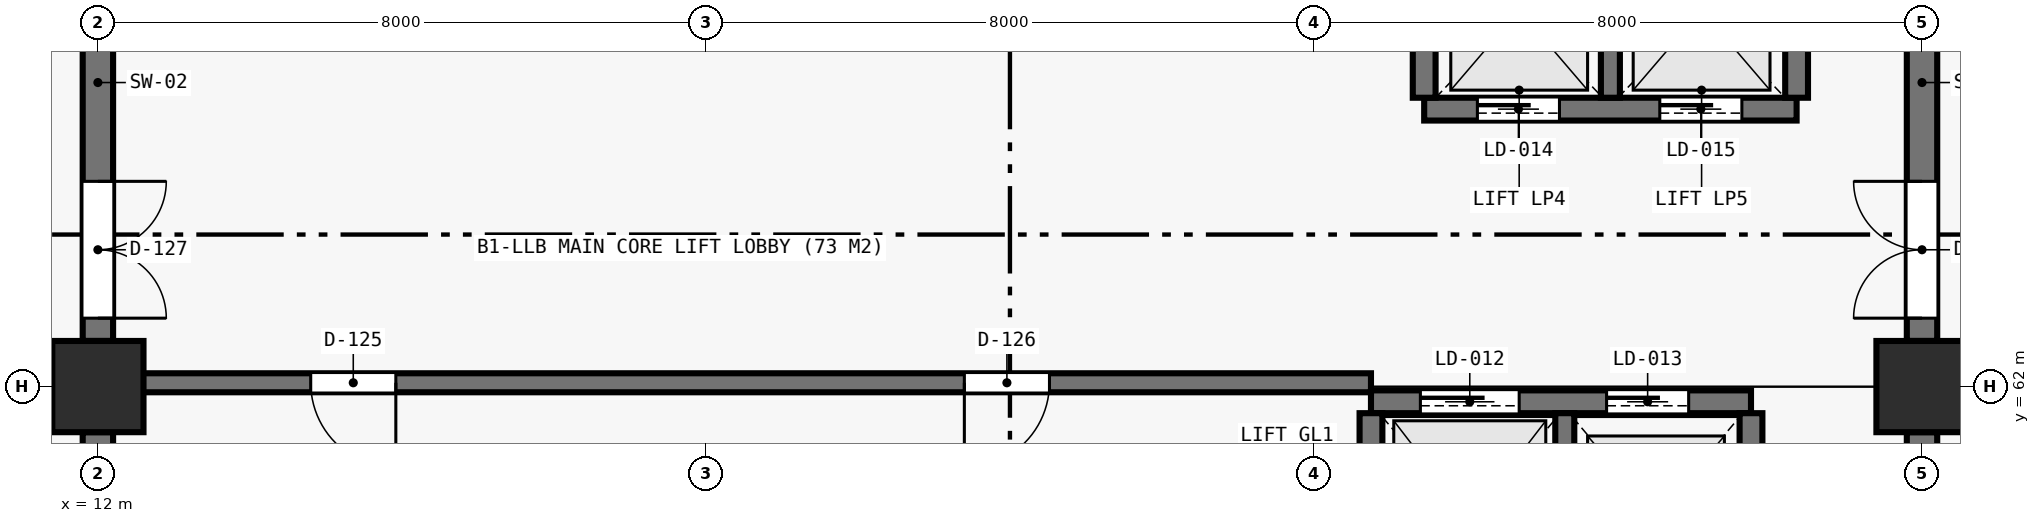
"""IFC4 building model, lengths in metres.
Left out: names, types, materials, properties, quantities, classifications, styles, units other than length and angle.
Written with IfcOpenShell. Run it as: python <this file> out.ifc"""

import sys

from ifc_helpers import new_model, si_unit, direction, frame, frame_2d, origin, origin_2d, place, context, subcontext, project, spatial, rectangle, extrude, element, fill, save


model = new_model("IFC4")
c1 = context("Model", 3, precision=1e-05, world=origin(), true_north=direction((0.0, 1.0)))
c2 = subcontext(c1, "Body", "Model", "MODEL_VIEW")
j1 = project(units=[si_unit("LENGTHUNIT", "METRE"), si_unit("PLANEANGLEUNIT", "RADIAN")], contexts=[c1])
p1 = place(None, origin())
s1 = spatial("IfcSite", under=j1, at=p1, CompositionType="ELEMENT")
p2 = place(p1, origin())
s2 = spatial("IfcBuilding", under=s1, at=p2, CompositionType="ELEMENT")
p3 = place(p2, frame((0.0, 0.0, -6.3)))
s3 = spatial("IfcBuildingStorey", under=s2, at=p3, CompositionType="ELEMENT", Elevation=-6.3)
for number, where, z_axis, x_axis in (
    (1, (12.0, 62.0, 0.0), (0.0, 0.0, 1.0), (1.0, 0.0, 0.0)),
    (2, (36.0, 62.0, 0.0), (0.0, 0.0, 1.0), (1.0, 0.0, 0.0)),
):
    element("IfcColumn", number, at=place(p3, frame(where, z_axis=z_axis, x_axis=x_axis)), inside=s3, PredefinedType="COLUMN", context=c2, shape_type="SweptSolid", body=[
        extrude(rectangle(XDim=1.2, YDim=1.2, at=origin_2d()), origin(), (0.0, 0.0, 1.0), 5.85),
    ])
p4 = place(p3, frame((12.0, 54.6, 0.0), z_axis=(0.0, 0.0, 1.0), x_axis=(0.0, 1.0, 0.0)))
e3 = element("IfcWall", 3, at=p4, inside=s3, PredefinedType="SHEAR", context=c2, shape_type="SweptSolid", body=[
    extrude(rectangle(XDim=6.8, YDim=0.4, at=frame_2d((3.4, 0.0))), origin(), (0.0, 0.0, 1.0), 5.85),
])
p5 = place(p3, frame((12.0, 62.6, 0.0), z_axis=(0.0, 0.0, 1.0), x_axis=(0.0, 1.0, 0.0)))
e4 = element("IfcWall", 4, at=p5, inside=s3, PredefinedType="SHEAR", context=c2, shape_type="SweptSolid", body=[
    extrude(rectangle(XDim=6.8, YDim=0.4, at=frame_2d((3.4, 0.0))), origin(), (0.0, 0.0, 1.0), 5.85),
])
p6 = place(p5, frame((0.3, 0.0, 0.0)))
e5 = element("IfcOpeningElement", 5, at=p6, cuts=e4, PredefinedType="OPENING", context=c2, shape_type="SweptSolid", body=[
    extrude(rectangle(XDim=1.8, YDim=2.2, at=frame_2d((0.9, 1.1))), frame((0.0, 0.21, 0.0), z_axis=(0.0, -1.0, 0.0), x_axis=(1.0, 0.0, 0.0)), (0.0, 0.0, 1.0), 0.42),
])
p7 = place(p3, frame((36.0, 54.6, 0.0), z_axis=(0.0, 0.0, 1.0), x_axis=(0.0, 1.0, 0.0)))
e6 = element("IfcWall", 6, at=p7, inside=s3, PredefinedType="SHEAR", context=c2, shape_type="SweptSolid", body=[
    extrude(rectangle(XDim=6.8, YDim=0.4, at=frame_2d((3.4, 0.0))), origin(), (0.0, 0.0, 1.0), 5.85),
])
p8 = place(p3, frame((36.0, 62.6, 0.0), z_axis=(0.0, 0.0, 1.0), x_axis=(0.0, 1.0, 0.0)))
e7 = element("IfcWall", 7, at=p8, inside=s3, PredefinedType="SHEAR", context=c2, shape_type="SweptSolid", body=[
    extrude(rectangle(XDim=6.8, YDim=0.4, at=frame_2d((3.4, 0.0))), origin(), (0.0, 0.0, 1.0), 5.85),
])
p9 = place(p8, frame((0.3, 0.0, 0.0)))
e8 = element("IfcOpeningElement", 8, at=p9, cuts=e7, PredefinedType="OPENING", context=c2, shape_type="SweptSolid", body=[
    extrude(rectangle(XDim=1.8, YDim=2.2, at=frame_2d((0.9, 1.1))), frame((0.0, 0.21, 0.0), z_axis=(0.0, -1.0, 0.0), x_axis=(1.0, 0.0, 0.0)), (0.0, 0.0, 1.0), 0.42),
])
p10 = place(p3, frame((28.75, 61.8, 0.0), z_axis=(0.0, 0.0, 1.0), x_axis=(1.0, 0.0, 0.0)))
e9 = element("IfcWall", 9, at=p10, inside=s3, PredefinedType="SHEAR", context=c2, shape_type="SweptSolid", body=[
    extrude(rectangle(XDim=5.0, YDim=0.3, at=frame_2d((2.5, 0.0))), origin(), (0.0, 0.0, 1.0), 5.85),
])
p11 = place(p10, frame((0.65, 0.0, 0.0)))
e10 = element("IfcOpeningElement", 10, at=p11, cuts=e9, PredefinedType="OPENING", context=c2, shape_type="SweptSolid", body=[
    extrude(rectangle(XDim=1.3, YDim=2.3, at=frame_2d((0.65, 1.15))), frame((0.0, 0.16, 0.0), z_axis=(0.0, -1.0, 0.0), x_axis=(1.0, 0.0, 0.0)), (0.0, 0.0, 1.0), 0.32),
])
p12 = place(p10, frame((3.1, 0.0, 0.0)))
e11 = element("IfcOpeningElement", 11, at=p12, cuts=e9, PredefinedType="OPENING", context=c2, shape_type="SweptSolid", body=[
    extrude(rectangle(XDim=1.08, YDim=2.2, at=frame_2d((0.54, 1.1))), frame((0.0, 0.16, 0.0), z_axis=(0.0, -1.0, 0.0), x_axis=(1.0, 0.0, 0.0)), (0.0, 0.0, 1.0), 0.32),
])
for number, where, z_axis, x_axis in (
    (12, (28.75, 58.8, 0.0), (0.0, 0.0, 1.0), (0.0, 1.0, 0.0)),
    (13, (33.75, 58.8, 0.0), (0.0, 0.0, 1.0), (0.0, 1.0, 0.0)),
):
    element("IfcWall", number, at=place(p3, frame(where, z_axis=z_axis, x_axis=x_axis)), inside=s3, PredefinedType="SHEAR", context=c2, shape_type="SweptSolid", body=[
        extrude(rectangle(XDim=2.85, YDim=0.3, at=frame_2d((1.425, 0.0))), origin(), (0.0, 0.0, 1.0), 5.85),
    ])
p13 = place(p3, frame((31.3, 58.8, 0.0), z_axis=(0.0, 0.0, 1.0), x_axis=(0.0, 1.0, 0.0)))
e14 = element("IfcWall", 14, at=p13, inside=s3, PredefinedType="SHEAR", context=c2, shape_type="SweptSolid", body=[
    extrude(rectangle(XDim=2.85, YDim=0.25, at=frame_2d((1.425, 0.0))), origin(), (0.0, 0.0, 1.0), 5.85),
])
p14 = place(p3, frame((12.2, 62.05, 0.0), z_axis=(0.0, 0.0, 1.0), x_axis=(1.0, 0.0, 0.0)))
e15 = element("IfcWall", 15, at=p14, inside=s3, PredefinedType="SHEAR", context=c2, shape_type="SweptSolid", body=[
    extrude(rectangle(XDim=16.55, YDim=0.25, at=frame_2d((8.275, 0.0))), origin(), (0.0, 0.0, 1.0), 5.85),
])
p15 = place(p14, frame((2.6, 0.0, 0.0)))
e16 = element("IfcOpeningElement", 16, at=p15, cuts=e15, PredefinedType="OPENING", context=c2, shape_type="SweptSolid", body=[
    extrude(rectangle(XDim=1.12, YDim=2.22, at=frame_2d((0.56, 1.11))), frame((0.0, 0.135, 0.0), z_axis=(0.0, -1.0, 0.0), x_axis=(1.0, 0.0, 0.0)), (0.0, 0.0, 1.0), 0.27),
])
p16 = place(p14, frame((11.2, 0.0, 0.0)))
e17 = element("IfcOpeningElement", 17, at=p16, cuts=e15, PredefinedType="OPENING", context=c2, shape_type="SweptSolid", body=[
    extrude(rectangle(XDim=1.12, YDim=2.22, at=frame_2d((0.56, 1.11))), frame((0.0, 0.135, 0.0), z_axis=(0.0, -1.0, 0.0), x_axis=(1.0, 0.0, 0.0)), (0.0, 0.0, 1.0), 0.27),
])
p17 = place(p3, frame((29.45, 65.65, 0.0), z_axis=(0.0, 0.0, 1.0), x_axis=(1.0, 0.0, 0.0)))
e18 = element("IfcWall", 18, at=p17, inside=s3, PredefinedType="SHEAR", context=c2, shape_type="SweptSolid", body=[
    extrude(rectangle(XDim=4.9, YDim=0.3, at=frame_2d((2.45, 0.0))), origin(), (0.0, 0.0, 1.0), 5.85),
])
p18 = place(p17, frame((0.7, 0.0, 0.0)))
e19 = element("IfcOpeningElement", 19, at=p18, cuts=e18, PredefinedType="OPENING", context=c2, shape_type="SweptSolid", body=[
    extrude(rectangle(XDim=1.08, YDim=2.2, at=frame_2d((0.54, 1.1))), frame((0.0, 0.16, 0.0), z_axis=(0.0, -1.0, 0.0), x_axis=(1.0, 0.0, 0.0)), (0.0, 0.0, 1.0), 0.32),
])
p19 = place(p17, frame((3.1, 0.0, 0.0)))
e20 = element("IfcOpeningElement", 20, at=p19, cuts=e18, PredefinedType="OPENING", context=c2, shape_type="SweptSolid", body=[
    extrude(rectangle(XDim=1.08, YDim=2.2, at=frame_2d((0.54, 1.1))), frame((0.0, 0.16, 0.0), z_axis=(0.0, -1.0, 0.0), x_axis=(1.0, 0.0, 0.0)), (0.0, 0.0, 1.0), 0.32),
])
for number, where, z_axis, x_axis in (
    (21, (29.45, 65.8, 0.0), (0.0, 0.0, 1.0), (0.0, 1.0, 0.0)),
    (22, (34.35, 65.8, 0.0), (0.0, 0.0, 1.0), (0.0, 1.0, 0.0)),
):
    element("IfcWall", number, at=place(p3, frame(where, z_axis=z_axis, x_axis=x_axis)), inside=s3, PredefinedType="SHEAR", context=c2, shape_type="SweptSolid", body=[
        extrude(rectangle(XDim=2.3, YDim=0.3, at=frame_2d((1.15, 0.0))), origin(), (0.0, 0.0, 1.0), 5.85),
    ])
p20 = place(p3, frame((31.9, 65.8, 0.0), z_axis=(0.0, 0.0, 1.0), x_axis=(0.0, 1.0, 0.0)))
e23 = element("IfcWall", 23, at=p20, inside=s3, PredefinedType="SHEAR", context=c2, shape_type="SweptSolid", body=[
    extrude(rectangle(XDim=2.3, YDim=0.25, at=frame_2d((1.15, 0.0))), origin(), (0.0, 0.0, 1.0), 5.85),
])
p21 = place(p3, frame((6.35, 61.85, 0.0), z_axis=(0.0, 0.0, 1.0), x_axis=(1.0, 0.0, 0.0)))
e24 = element("IfcWall", 24, at=p21, inside=s3, PredefinedType="PLUMBINGWALL", context=c2, shape_type="SweptSolid", body=[
    extrude(rectangle(XDim=5.2, YDim=0.21, at=frame_2d((2.6, 0.0))), origin(), (0.0, 0.0, 1.0), 4.65),
])
p22 = place(p21, frame((0.35, 0.0, 0.0)))
e25 = element("IfcOpeningElement", 25, at=p22, cuts=e24, PredefinedType="OPENING", context=c2, shape_type="SweptSolid", body=[
    extrude(rectangle(XDim=0.95, YDim=2.1, at=frame_2d((0.475, 1.05))), frame((0.0, 0.115, 0.0), z_axis=(0.0, -1.0, 0.0), x_axis=(1.0, 0.0, 0.0)), (0.0, 0.0, 1.0), 0.23),
])
p23 = place(p21, frame((2.1, 0.0, 0.0)))
e26 = element("IfcOpeningElement", 26, at=p23, cuts=e24, PredefinedType="OPENING", context=c2, shape_type="SweptSolid", body=[
    extrude(rectangle(XDim=0.9, YDim=2.1, at=frame_2d((0.45, 1.05))), frame((0.0, 0.115, 0.0), z_axis=(0.0, -1.0, 0.0), x_axis=(1.0, 0.0, 0.0)), (0.0, 0.0, 1.0), 0.23),
])
p24 = place(p21, frame((3.8, 0.0, 0.0)))
e27 = element("IfcOpeningElement", 27, at=p24, cuts=e24, PredefinedType="OPENING", context=c2, shape_type="SweptSolid", body=[
    extrude(rectangle(XDim=0.9, YDim=2.1, at=frame_2d((0.45, 1.05))), frame((0.0, 0.115, 0.0), z_axis=(0.0, -1.0, 0.0), x_axis=(1.0, 0.0, 0.0)), (0.0, 0.0, 1.0), 0.23),
])
p25 = place(p11, origin())
e28 = element("IfcDoor", 28, at=p25, inside=s3, OperationType="SLIDING_TO_LEFT", PredefinedType="DOOR", context=c2, shape_type="SweptSolid", body=[
    extrude(rectangle(XDim=1.3, YDim=2.3, at=frame_2d((0.65, 1.15))), frame((0.0, 0.025, 0.0), z_axis=(0.0, -1.0, 0.0), x_axis=(1.0, 0.0, 0.0)), (0.0, 0.0, 1.0), 0.05),
])
fill(e10, e28)
p26 = place(p12, origin())
e29 = element("IfcDoor", 29, at=p26, inside=s3, OperationType="SLIDING_TO_LEFT", PredefinedType="DOOR", context=c2, shape_type="SweptSolid", body=[
    extrude(rectangle(XDim=1.08, YDim=2.2, at=frame_2d((0.54, 1.1))), frame((0.0, 0.025, 0.0), z_axis=(0.0, -1.0, 0.0), x_axis=(1.0, 0.0, 0.0)), (0.0, 0.0, 1.0), 0.05),
])
fill(e11, e29)
p27 = place(p18, origin())
e30 = element("IfcDoor", 30, at=p27, inside=s3, OperationType="SLIDING_TO_LEFT", PredefinedType="DOOR", context=c2, shape_type="SweptSolid", body=[
    extrude(rectangle(XDim=1.08, YDim=2.2, at=frame_2d((0.54, 1.1))), frame((0.0, 0.025, 0.0), z_axis=(0.0, -1.0, 0.0), x_axis=(1.0, 0.0, 0.0)), (0.0, 0.0, 1.0), 0.05),
])
fill(e19, e30)
p28 = place(p19, origin())
e31 = element("IfcDoor", 31, at=p28, inside=s3, OperationType="SLIDING_TO_LEFT", PredefinedType="DOOR", context=c2, shape_type="SweptSolid", body=[
    extrude(rectangle(XDim=1.08, YDim=2.2, at=frame_2d((0.54, 1.1))), frame((0.0, 0.025, 0.0), z_axis=(0.0, -1.0, 0.0), x_axis=(1.0, 0.0, 0.0)), (0.0, 0.0, 1.0), 0.05),
])
fill(e20, e31)
p29 = place(p15, frame((1.12, 0.0, 0.0), z_axis=(0.0, 0.0, 1.0), x_axis=(-1.0, 0.0, 0.0)))
e32 = element("IfcDoor", 32, at=p29, inside=s3, OperationType="SINGLE_SWING_LEFT", PredefinedType="DOOR", context=c2, shape_type="SweptSolid", body=[
    extrude(rectangle(XDim=1.12, YDim=2.22, at=frame_2d((0.56, 1.11))), frame((0.0, 0.025, 0.0), z_axis=(0.0, -1.0, 0.0), x_axis=(1.0, 0.0, 0.0)), (0.0, 0.0, 1.0), 0.05),
])
fill(e16, e32)
p30 = place(p16, frame((1.12, 0.0, 0.0), z_axis=(0.0, 0.0, 1.0), x_axis=(-1.0, 0.0, 0.0)))
e33 = element("IfcDoor", 33, at=p30, inside=s3, OperationType="SINGLE_SWING_RIGHT", PredefinedType="DOOR", context=c2, shape_type="SweptSolid", body=[
    extrude(rectangle(XDim=1.12, YDim=2.22, at=frame_2d((0.56, 1.11))), frame((0.0, 0.025, 0.0), z_axis=(0.0, -1.0, 0.0), x_axis=(1.0, 0.0, 0.0)), (0.0, 0.0, 1.0), 0.05),
])
fill(e17, e33)
p31 = place(p6, frame((1.8, 0.0, 0.0), z_axis=(0.0, 0.0, 1.0), x_axis=(-1.0, 0.0, 0.0)))
e34 = element("IfcDoor", 34, at=p31, inside=s3, OperationType="DOUBLE_DOOR_SINGLE_SWING", PredefinedType="DOOR", context=c2, shape_type="SweptSolid", body=[
    extrude(rectangle(XDim=1.8, YDim=2.2, at=frame_2d((0.9, 1.1))), frame((0.0, 0.025, 0.0), z_axis=(0.0, -1.0, 0.0), x_axis=(1.0, 0.0, 0.0)), (0.0, 0.0, 1.0), 0.05),
])
fill(e5, e34)
p32 = place(p9, origin())
e35 = element("IfcDoor", 35, at=p32, inside=s3, OperationType="DOUBLE_DOOR_SINGLE_SWING", PredefinedType="DOOR", context=c2, shape_type="SweptSolid", body=[
    extrude(rectangle(XDim=1.8, YDim=2.2, at=frame_2d((0.9, 1.1))), frame((0.0, 0.025, 0.0), z_axis=(0.0, -1.0, 0.0), x_axis=(1.0, 0.0, 0.0)), (0.0, 0.0, 1.0), 0.05),
])
fill(e8, e35)
save(model, sys.argv[1])
